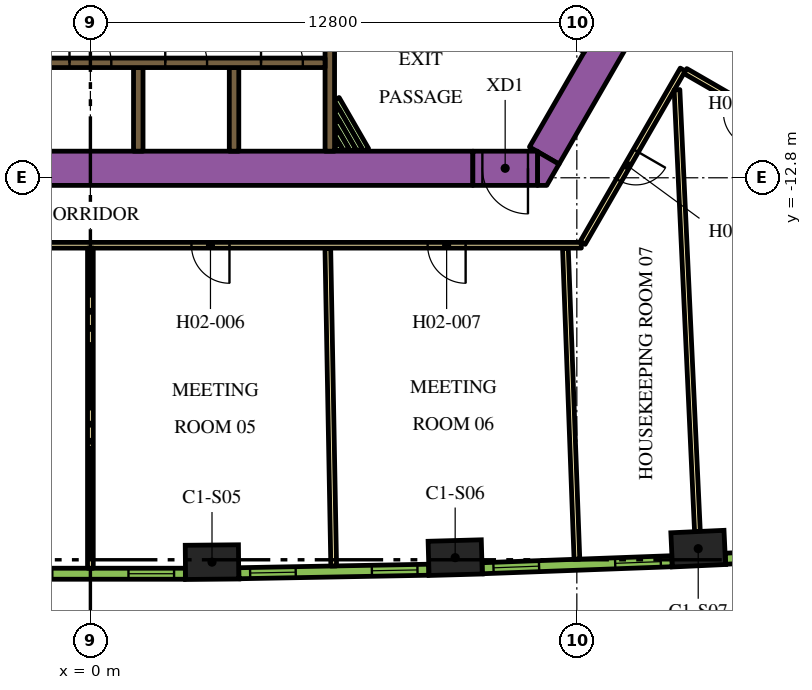
"""IFC4 building model, lengths in metres.
Left out: names, types, materials, properties, quantities, classifications, styles, units other than length and angle.
Written with IfcOpenShell. Run it as: python <this file> out.ifc"""

import sys

from ifc_helpers import new_model, si_unit, direction, frame, frame_2d, origin, origin_2d, place, context, subcontext, project, spatial, polyline, rectangle, outline, extrude, element, fill, save


model = new_model("IFC4")
c1 = context("Model", 3, precision=1e-05, world=origin(), true_north=direction((0.0, 1.0)))
c2 = subcontext(c1, "Body", "Model", "MODEL_VIEW")
j1 = project(units=[si_unit("LENGTHUNIT", "METRE"), si_unit("PLANEANGLEUNIT", "RADIAN")], contexts=[c1])
p1 = place(None, origin())
s1 = spatial("IfcSite", under=j1, at=p1, CompositionType="ELEMENT")
p2 = place(p1, origin())
s2 = spatial("IfcBuilding", under=s1, at=p2, CompositionType="ELEMENT")
p3 = place(p2, frame((0.0, 0.0, 43.2)))
s3 = spatial("IfcBuildingStorey", under=s2, at=p3, CompositionType="ELEMENT", Elevation=43.2)
for number, where, z_axis, x_axis in (
    (1, (3.2, -22.913, 0.0), (0.0, 0.0, 1.0), (1.0, 0.009, 0.0)),
    (2, (9.599, -22.795, 0.0), (0.0, 0.0, 1.0), (1.0, 0.028, 0.0)),
    (3, (15.994, -22.558, 0.0), (0.0, 0.0, 1.0), (0.999, 0.046, 0.0)),
):
    element("IfcColumn", number, at=place(p3, frame(where, z_axis=z_axis, x_axis=x_axis)), inside=s3, PredefinedType="COLUMN", context=c2, shape_type="SweptSolid", body=[
        extrude(rectangle(XDim=1.4, YDim=0.9, at=origin_2d()), origin(), (0.0, 0.0, 1.0), 3.9),
    ])
p4 = place(p3, frame((11.943, -12.214, 0.0), z_axis=(0.0, 0.0, 1.0), x_axis=(0.49998092645, 0.866036415623, 0.0)))
e4 = element("IfcWall", 4, at=p4, inside=s3, PredefinedType="SOLIDWALL", context=c2, shape_type="SweptSolid", body=[
    extrude(rectangle(XDim=8.83, YDim=0.9, at=frame_2d((4.415, 0.0))), origin(), (0.0, 0.0, 1.0), 3.9),
])
p5 = place(p3, origin())
e5 = element("IfcWall", 5, at=p5, inside=s3, PredefinedType="SOLIDWALL", context=c2, shape_type="SweptSolid", body=[
    extrude(outline(polyline([(12.009, -13.0), (11.764, -13.0), (11.764, -12.113), (12.332, -12.441), (12.009, -13.0)])), origin(), (0.0, 0.0, 1.0), 3.9),
])
p6 = place(p3, frame((-12.019, -12.55, 0.0), z_axis=(0.0, 0.0, 1.0), x_axis=(1.0, 0.0, 0.0)))
e6 = element("IfcWall", 6, at=p6, inside=s3, PredefinedType="SOLIDWALL", context=c2, shape_type="SweptSolid", body=[
    extrude(rectangle(XDim=22.083, YDim=0.9, at=frame_2d((11.042, 0.0))), origin(), (0.0, 0.0, 1.0), 3.9),
])
p7 = place(p3, frame((6.3, -12.1, 0.0), z_axis=(0.0, 0.0, 1.0), x_axis=(0.0, 1.0, 0.0)))
e7 = element("IfcWall", 7, at=p7, inside=s3, PredefinedType="SOLIDWALL", context=c2, shape_type="SweptSolid", body=[
    extrude(rectangle(XDim=3.428, YDim=0.25, at=frame_2d((1.714, 0.0))), origin(), (0.0, 0.0, 1.0), 3.9),
])
for number, where, z_axis, x_axis in (
    (8, (3.78, -12.1, 0.0), (0.0, 0.0, 1.0), (0.0, 1.0, 0.0)),
    (9, (1.26, -12.1, 0.0), (0.0, 0.0, 1.0), (0.0, 1.0, 0.0)),
):
    element("IfcWall", number, at=place(p3, frame(where, z_axis=z_axis, x_axis=x_axis)), inside=s3, PredefinedType="SOLIDWALL", context=c2, shape_type="SweptSolid", body=[
        extrude(rectangle(XDim=2.2, YDim=0.25, at=frame_2d((1.1, 0.0))), origin(), (0.0, 0.0, 1.0), 3.9),
    ])
p8 = place(p3, frame((6.48, -10.726, 0.0), z_axis=(0.0, 0.0, 1.0), x_axis=(0.500017819788, -0.86601511528, 0.0)))
e10 = element("IfcWall", 10, at=p8, inside=s3, PredefinedType="PARTITIONING", context=c2, shape_type="SweptSolid", body=[
    extrude(rectangle(XDim=1.55, YDim=0.15, at=frame_2d((0.775, 0.0))), origin(), (0.0, 0.0, 1.0), 2.75),
])
p9 = place(p3, frame((6.48, -11.026, 0.0), z_axis=(0.0, 0.0, 1.0), x_axis=(0.49995654735, -0.86605048973, 0.0)))
e11 = element("IfcWall", 11, at=p9, inside=s3, PredefinedType="PARTITIONING", context=c2, shape_type="SweptSolid", body=[
    extrude(rectangle(XDim=1.204, YDim=0.15, at=frame_2d((0.602, 0.0))), origin(), (0.0, 0.0, 1.0), 2.75),
])
p10 = place(p3, frame((6.48, -11.326, 0.0), z_axis=(0.0, 0.0, 1.0), x_axis=(0.500059337743, -0.865991142412, 0.0)))
e12 = element("IfcWall", 12, at=p10, inside=s3, PredefinedType="PARTITIONING", context=c2, shape_type="SweptSolid", body=[
    extrude(rectangle(XDim=0.857, YDim=0.15, at=frame_2d((0.429, 0.0))), origin(), (0.0, 0.0, 1.0), 2.75),
])
p11 = place(p3, frame((6.48, -11.626, 0.0), z_axis=(0.0, 0.0, 1.0), x_axis=(0.500301480982, -0.865851273677, 0.0)))
e13 = element("IfcWall", 13, at=p11, inside=s3, PredefinedType="PARTITIONING", context=c2, shape_type="SweptSolid", body=[
    extrude(rectangle(XDim=0.511, YDim=0.15, at=frame_2d((0.255, 0.0))), origin(), (0.0, 0.0, 1.0), 2.75),
])
p12 = place(p3, frame((6.48, -11.926, 0.0), z_axis=(0.0, 0.0, 1.0), x_axis=(0.500450775723, -0.86576499183, 0.0)))
e14 = element("IfcWall", 14, at=p12, inside=s3, PredefinedType="PARTITIONING", context=c2, shape_type="SweptSolid", body=[
    extrude(rectangle(XDim=0.164, YDim=0.15, at=frame_2d((0.082, 0.0))), origin(), (0.0, 0.0, 1.0), 2.75),
])
p13 = place(p3, frame((-6.175, -9.775, 0.0), z_axis=(0.0, 0.0, 1.0), x_axis=(1.0, 0.0, 0.0)))
e15 = element("IfcWall", 15, at=p13, inside=s3, PredefinedType="SOLIDWALL", context=c2, shape_type="SweptSolid", body=[
    extrude(rectangle(XDim=12.35, YDim=0.25, at=frame_2d((6.175, 0.0))), origin(), (0.0, 0.0, 1.0), 3.9),
])
p14 = place(p13, frame((0.585, 0.0, 0.0)))
e16 = element("IfcOpeningElement", 16, at=p14, cuts=e15, PredefinedType="OPENING", context=c2, shape_type="SweptSolid", body=[
    extrude(rectangle(XDim=1.1, YDim=2.1, at=frame_2d((0.55, 1.05))), frame((0.0, 0.135, 0.0), z_axis=(0.0, -1.0, 0.0), x_axis=(1.0, 0.0, 0.0)), (0.0, 0.0, 1.0), 0.27),
])
p15 = place(p13, frame((3.105, 0.0, 0.0)))
e17 = element("IfcOpeningElement", 17, at=p15, cuts=e15, PredefinedType="OPENING", context=c2, shape_type="SweptSolid", body=[
    extrude(rectangle(XDim=1.1, YDim=2.1, at=frame_2d((0.55, 1.05))), frame((0.0, 0.135, 0.0), z_axis=(0.0, -1.0, 0.0), x_axis=(1.0, 0.0, 0.0)), (0.0, 0.0, 1.0), 0.27),
])
p16 = place(p13, frame((5.625, 0.0, 0.0)))
e18 = element("IfcOpeningElement", 18, at=p16, cuts=e15, PredefinedType="OPENING", context=c2, shape_type="SweptSolid", body=[
    extrude(rectangle(XDim=1.1, YDim=2.1, at=frame_2d((0.55, 1.05))), frame((0.0, 0.135, 0.0), z_axis=(0.0, -1.0, 0.0), x_axis=(1.0, 0.0, 0.0)), (0.0, 0.0, 1.0), 0.27),
])
p17 = place(p13, frame((8.145, 0.0, 0.0)))
e19 = element("IfcOpeningElement", 19, at=p17, cuts=e15, PredefinedType="OPENING", context=c2, shape_type="SweptSolid", body=[
    extrude(rectangle(XDim=1.1, YDim=2.1, at=frame_2d((0.55, 1.05))), frame((0.0, 0.135, 0.0), z_axis=(0.0, -1.0, 0.0), x_axis=(1.0, 0.0, 0.0)), (0.0, 0.0, 1.0), 0.27),
])
p18 = place(p13, frame((10.665, 0.0, 0.0)))
e20 = element("IfcOpeningElement", 20, at=p18, cuts=e15, PredefinedType="OPENING", context=c2, shape_type="SweptSolid", body=[
    extrude(rectangle(XDim=1.1, YDim=2.1, at=frame_2d((0.55, 1.05))), frame((0.0, 0.135, 0.0), z_axis=(0.0, -1.0, 0.0), x_axis=(1.0, 0.0, 0.0)), (0.0, 0.0, 1.0), 0.27),
])
p19 = place(p3, frame((11.764, -12.55, 0.0), z_axis=(0.0, 0.0, 1.0), x_axis=(-1.0, 0.0, 0.0)))
e21 = element("IfcWall", 21, at=p19, inside=s3, PredefinedType="SOLIDWALL", context=c2, shape_type="SweptSolid", body=[
    extrude(rectangle(XDim=1.7, YDim=0.9, at=frame_2d((0.85, 0.0))), origin(), (0.0, 0.0, 1.0), 3.9),
])
p20 = place(p19, frame((0.25, 0.0, 0.0)))
e22 = element("IfcOpeningElement", 22, at=p20, cuts=e21, PredefinedType="OPENING", context=c2, shape_type="SweptSolid", body=[
    extrude(rectangle(XDim=1.2, YDim=2.1, at=frame_2d((0.6, 1.05))), frame((0.0, 0.46, 0.0), z_axis=(0.0, -1.0, 0.0), x_axis=(1.0, 0.0, 0.0)), (0.0, 0.0, 1.0), 0.92),
])
p21 = place(p3, frame((16.412, -8.523, 0.0), z_axis=(0.0, 0.0, 1.0), x_axis=(0.866022197818, -0.500005552856, 0.0)))
e23 = element("IfcWall", 23, at=p21, inside=s3, PredefinedType="PARTITIONING", context=c2, shape_type="SweptSolid", body=[
    extrude(rectangle(XDim=16.224, YDim=0.15, at=frame_2d((8.112, 0.0))), origin(), (0.0, 0.0, 1.0), 2.75),
])
p22 = place(p21, frame((7.949, 0.0, 0.0)))
e24 = element("IfcOpeningElement", 24, at=p22, cuts=e23, PredefinedType="OPENING", context=c2, shape_type="SweptSolid", body=[
    extrude(rectangle(XDim=1.0, YDim=2.1, at=frame_2d((0.5, 1.05))), frame((0.0, 0.085, 0.0), z_axis=(0.0, -1.0, 0.0), x_axis=(1.0, 0.0, 0.0)), (0.0, 0.0, 1.0), 0.17),
])
p23 = place(p21, frame((0.526, 0.0, 0.0)))
e25 = element("IfcOpeningElement", 25, at=p23, cuts=e23, PredefinedType="OPENING", context=c2, shape_type="SweptSolid", body=[
    extrude(rectangle(XDim=1.0, YDim=2.1, at=frame_2d((0.5, 1.05))), frame((0.0, 0.085, 0.0), z_axis=(0.0, -1.0, 0.0), x_axis=(1.0, 0.0, 0.0)), (0.0, 0.0, 1.0), 0.17),
])
p24 = place(p3, frame((12.918, -14.575, 0.0), z_axis=(0.0, 0.0, 1.0), x_axis=(-1.0, 0.0, 0.0)))
e26 = element("IfcWall", 26, at=p24, inside=s3, PredefinedType="PARTITIONING", context=c2, shape_type="SweptSolid", body=[
    extrude(rectangle(XDim=25.766, YDim=0.15, at=frame_2d((12.883, 0.0))), origin(), (0.0, 0.0, 1.0), 2.75),
])
p25 = place(p24, frame((17.141, 0.0, 0.0)))
e27 = element("IfcOpeningElement", 27, at=p25, cuts=e26, PredefinedType="OPENING", context=c2, shape_type="SweptSolid", body=[
    extrude(rectangle(XDim=1.0, YDim=2.1, at=frame_2d((0.5, 1.05))), frame((0.0, 0.085, 0.0), z_axis=(0.0, -1.0, 0.0), x_axis=(1.0, 0.0, 0.0)), (0.0, 0.0, 1.0), 0.17),
])
p26 = place(p24, frame((9.259, 0.0, 0.0)))
e28 = element("IfcOpeningElement", 28, at=p26, cuts=e26, PredefinedType="OPENING", context=c2, shape_type="SweptSolid", body=[
    extrude(rectangle(XDim=1.0, YDim=2.1, at=frame_2d((0.5, 1.05))), frame((0.0, 0.085, 0.0), z_axis=(0.0, -1.0, 0.0), x_axis=(1.0, 0.0, 0.0)), (0.0, 0.0, 1.0), 0.17),
])
p27 = place(p24, frame((3.044, 0.0, 0.0)))
e29 = element("IfcOpeningElement", 29, at=p27, cuts=e26, PredefinedType="OPENING", context=c2, shape_type="SweptSolid", body=[
    extrude(rectangle(XDim=1.0, YDim=2.1, at=frame_2d((0.5, 1.05))), frame((0.0, 0.085, 0.0), z_axis=(0.0, -1.0, 0.0), x_axis=(1.0, 0.0, 0.0)), (0.0, 0.0, 1.0), 0.17),
])
p28 = place(p3, frame((15.587, -9.952, 0.0), z_axis=(0.0, 0.0, 1.0), x_axis=(-0.500016618951, -0.866015808616, 0.0)))
e30 = element("IfcWall", 30, at=p28, inside=s3, PredefinedType="PARTITIONING", context=c2, shape_type="SweptSolid", body=[
    extrude(rectangle(XDim=5.268, YDim=0.15, at=frame_2d((2.634, 0.0))), origin(), (0.0, 0.0, 1.0), 2.75),
])
p29 = place(p28, frame((2.465, 0.0, 0.0)))
e31 = element("IfcOpeningElement", 31, at=p29, cuts=e30, PredefinedType="OPENING", context=c2, shape_type="SweptSolid", body=[
    extrude(rectangle(XDim=0.9, YDim=2.1, at=frame_2d((0.45, 1.05))), frame((0.0, 0.085, 0.0), z_axis=(0.0, -1.0, 0.0), x_axis=(1.0, 0.0, 0.0)), (0.0, 0.0, 1.0), 0.17),
])
p30 = place(p3, frame((29.638, -18.064, 0.0), z_axis=(0.0, 0.0, 1.0), x_axis=(-0.866026175601, 0.499998663172, 0.0)))
e32 = element("IfcWall", 32, at=p30, inside=s3, PredefinedType="PARTITIONING", context=c2, shape_type="SweptSolid", body=[
    extrude(rectangle(XDim=16.144, YDim=0.15, at=frame_2d((8.072, 0.0))), origin(), (0.0, 0.0, 1.0), 2.75),
])
p31 = place(p30, frame((13.948, 0.0, 0.0)))
e33 = element("IfcOpeningElement", 33, at=p31, cuts=e32, PredefinedType="OPENING", context=c2, shape_type="SweptSolid", body=[
    extrude(rectangle(XDim=0.9, YDim=2.1, at=frame_2d((0.45, 1.05))), frame((0.0, 0.085, 0.0), z_axis=(0.0, -1.0, 0.0), x_axis=(1.0, 0.0, 0.0)), (0.0, 0.0, 1.0), 0.17),
])
p32 = place(p30, frame((11.004, 0.0, 0.0)))
e34 = element("IfcOpeningElement", 34, at=p32, cuts=e32, PredefinedType="OPENING", context=c2, shape_type="SweptSolid", body=[
    extrude(rectangle(XDim=1.0, YDim=2.1, at=frame_2d((0.5, 1.05))), frame((0.0, 0.085, 0.0), z_axis=(0.0, -1.0, 0.0), x_axis=(1.0, 0.0, 0.0)), (0.0, 0.0, 1.0), 0.17),
])
p33 = place(p3, frame((0.0, -23.073, 0.0), z_axis=(0.0, 0.0, 1.0), x_axis=(0.0, 1.0, 0.0)))
e35 = element("IfcWall", 35, at=p33, inside=s3, PredefinedType="PARTITIONING", context=c2, shape_type="SweptSolid", body=[
    extrude(rectangle(XDim=8.423, YDim=0.15, at=frame_2d((4.212, 0.0))), origin(), (0.0, 0.0, 1.0), 2.75),
])
p34 = place(p3, frame((6.402, -23.014, 0.0), z_axis=(0.0, 0.0, 1.0), x_axis=(-0.01849587109, 0.999828936745, 0.0)))
e36 = element("IfcWall", 36, at=p34, inside=s3, PredefinedType="PARTITIONING", context=c2, shape_type="SweptSolid", body=[
    extrude(rectangle(XDim=8.355, YDim=0.15, at=frame_2d((4.178, 0.0))), origin(), (0.0, 0.0, 1.0), 2.75),
])
p35 = place(p3, frame((12.802, -22.836, 0.0), z_axis=(0.0, 0.0, 1.0), x_axis=(-0.036969723281, 0.999316386116, 0.0)))
e37 = element("IfcWall", 37, at=p35, inside=s3, PredefinedType="PARTITIONING", context=c2, shape_type="SweptSolid", body=[
    extrude(rectangle(XDim=8.182, YDim=0.15, at=frame_2d((4.091, 0.0))), origin(), (0.0, 0.0, 1.0), 2.75),
])
p36 = place(p3, frame((15.973, -22.109, 0.0), z_axis=(0.0, 0.0, 1.0), x_axis=(-0.046191717129, 0.998932592955, 0.0)))
e38 = element("IfcWall", 38, at=p36, inside=s3, PredefinedType="PARTITIONING", context=c2, shape_type="SweptSolid", body=[
    extrude(rectangle(XDim=11.638, YDim=0.15, at=frame_2d((5.819, 0.0))), origin(), (0.0, 0.0, 1.0), 2.75),
])
p37 = place(p3, frame((-2.499, -23.218, 0.0), z_axis=(0.0, 0.0, 1.0), x_axis=(1.0, 0.0, 0.0)))
e39 = element("IfcWall", 39, at=p37, inside=s3, PredefinedType="SOLIDWALL", context=c2, shape_type="SweptSolid", body=[
    extrude(rectangle(XDim=4.998, YDim=0.29, at=frame_2d((2.499, 0.0))), origin(), (0.0, 0.0, 1.0), 3.65),
])
p38 = place(p37, frame((0.297, 0.0, 0.9)))
e40 = element("IfcOpeningElement", 40, at=p38, cuts=e39, PredefinedType="OPENING", context=c2, shape_type="SweptSolid", body=[
    extrude(rectangle(XDim=1.2, YDim=2.15, at=frame_2d((0.6, 1.075))), frame((0.0, 0.155, 0.0), z_axis=(0.0, -1.0, 0.0), x_axis=(1.0, 0.0, 0.0)), (0.0, 0.0, 1.0), 0.31),
])
p39 = place(p37, frame((3.501, 0.0, 0.9)))
e41 = element("IfcOpeningElement", 41, at=p39, cuts=e39, PredefinedType="OPENING", context=c2, shape_type="SweptSolid", body=[
    extrude(rectangle(XDim=1.2, YDim=2.15, at=frame_2d((0.6, 1.075))), frame((0.0, 0.155, 0.0), z_axis=(0.0, -1.0, 0.0), x_axis=(1.0, 0.0, 0.0)), (0.0, 0.0, 1.0), 0.31),
])
p40 = place(p3, frame((3.906, -23.205, 0.0), z_axis=(0.0, 0.0, 1.0), x_axis=(0.999829529479, 0.018463801951, 0.0)))
e42 = element("IfcWall", 42, at=p40, inside=s3, PredefinedType="SOLIDWALL", context=c2, shape_type="SweptSolid", body=[
    extrude(rectangle(XDim=4.998, YDim=0.29, at=frame_2d((2.499, 0.0))), origin(), (0.0, 0.0, 1.0), 3.65),
])
p41 = place(p40, frame((0.297, 0.0, 0.9)))
e43 = element("IfcOpeningElement", 43, at=p41, cuts=e42, PredefinedType="OPENING", context=c2, shape_type="SweptSolid", body=[
    extrude(rectangle(XDim=1.2, YDim=2.15, at=frame_2d((0.6, 1.075))), frame((0.0, 0.155, 0.0), z_axis=(0.0, -1.0, 0.0), x_axis=(1.0, 0.0, 0.0)), (0.0, 0.0, 1.0), 0.31),
])
p42 = place(p40, frame((3.501, 0.0, 0.9)))
e44 = element("IfcOpeningElement", 44, at=p42, cuts=e42, PredefinedType="OPENING", context=c2, shape_type="SweptSolid", body=[
    extrude(rectangle(XDim=1.2, YDim=2.15, at=frame_2d((0.6, 1.075))), frame((0.0, 0.155, 0.0), z_axis=(0.0, -1.0, 0.0), x_axis=(1.0, 0.0, 0.0)), (0.0, 0.0, 1.0), 0.31),
])
p43 = place(p3, frame((10.31, -23.074, 0.0), z_axis=(0.0, 0.0, 1.0), x_axis=(0.999317974969, 0.036926750529, 0.0)))
e45 = element("IfcWall", 45, at=p43, inside=s3, PredefinedType="SOLIDWALL", context=c2, shape_type="SweptSolid", body=[
    extrude(rectangle(XDim=4.998, YDim=0.29, at=frame_2d((2.499, 0.0))), origin(), (0.0, 0.0, 1.0), 3.65),
])
p44 = place(p43, frame((0.297, 0.0, 0.9)))
e46 = element("IfcOpeningElement", 46, at=p44, cuts=e45, PredefinedType="OPENING", context=c2, shape_type="SweptSolid", body=[
    extrude(rectangle(XDim=1.2, YDim=2.15, at=frame_2d((0.6, 1.075))), frame((0.0, 0.155, 0.0), z_axis=(0.0, -1.0, 0.0), x_axis=(1.0, 0.0, 0.0)), (0.0, 0.0, 1.0), 0.31),
])
p45 = place(p43, frame((3.501, 0.0, 0.9)))
e47 = element("IfcOpeningElement", 47, at=p45, cuts=e45, PredefinedType="OPENING", context=c2, shape_type="SweptSolid", body=[
    extrude(rectangle(XDim=1.2, YDim=2.15, at=frame_2d((0.6, 1.075))), frame((0.0, 0.155, 0.0), z_axis=(0.0, -1.0, 0.0), x_axis=(1.0, 0.0, 0.0)), (0.0, 0.0, 1.0), 0.31),
])
p46 = place(p3, frame((16.711, -22.824, 0.0), z_axis=(0.0, 0.0, 1.0), x_axis=(0.998464708705, 0.055391564976, 0.0)))
e48 = element("IfcWall", 48, at=p46, inside=s3, PredefinedType="SOLIDWALL", context=c2, shape_type="SweptSolid", body=[
    extrude(rectangle(XDim=4.998, YDim=0.29, at=frame_2d((2.499, 0.0))), origin(), (0.0, 0.0, 1.0), 3.65),
])
p47 = place(p46, frame((0.297, 0.0, 0.9)))
e49 = element("IfcOpeningElement", 49, at=p47, cuts=e48, PredefinedType="OPENING", context=c2, shape_type="SweptSolid", body=[
    extrude(rectangle(XDim=1.2, YDim=2.15, at=frame_2d((0.6, 1.075))), frame((0.0, 0.155, 0.0), z_axis=(0.0, -1.0, 0.0), x_axis=(1.0, 0.0, 0.0)), (0.0, 0.0, 1.0), 0.31),
])
p48 = place(p46, frame((3.501, 0.0, 0.9)))
e50 = element("IfcOpeningElement", 50, at=p48, cuts=e48, PredefinedType="OPENING", context=c2, shape_type="SweptSolid", body=[
    extrude(rectangle(XDim=1.2, YDim=2.15, at=frame_2d((0.6, 1.075))), frame((0.0, 0.155, 0.0), z_axis=(0.0, -1.0, 0.0), x_axis=(1.0, 0.0, 0.0)), (0.0, 0.0, 1.0), 0.31),
])
p49 = place(p16, origin())
e51 = element("IfcDoor", 51, at=p49, inside=s3, OperationType="DOUBLE_DOOR_SLIDING", PredefinedType="DOOR", context=c2, shape_type="SweptSolid", body=[
    extrude(rectangle(XDim=1.1, YDim=2.1, at=frame_2d((0.55, 1.05))), frame((0.0, 0.025, 0.0), z_axis=(0.0, -1.0, 0.0), x_axis=(1.0, 0.0, 0.0)), (0.0, 0.0, 1.0), 0.05),
])
fill(e18, e51)
p50 = place(p17, origin())
e52 = element("IfcDoor", 52, at=p50, inside=s3, OperationType="DOUBLE_DOOR_SLIDING", PredefinedType="DOOR", context=c2, shape_type="SweptSolid", body=[
    extrude(rectangle(XDim=1.1, YDim=2.1, at=frame_2d((0.55, 1.05))), frame((0.0, 0.025, 0.0), z_axis=(0.0, -1.0, 0.0), x_axis=(1.0, 0.0, 0.0)), (0.0, 0.0, 1.0), 0.05),
])
fill(e19, e52)
p51 = place(p18, origin())
e53 = element("IfcDoor", 53, at=p51, inside=s3, OperationType="DOUBLE_DOOR_SLIDING", PredefinedType="DOOR", context=c2, shape_type="SweptSolid", body=[
    extrude(rectangle(XDim=1.1, YDim=2.1, at=frame_2d((0.55, 1.05))), frame((0.0, 0.025, 0.0), z_axis=(0.0, -1.0, 0.0), x_axis=(1.0, 0.0, 0.0)), (0.0, 0.0, 1.0), 0.05),
])
fill(e20, e53)
p52 = place(p20, origin())
e54 = element("IfcDoor", 54, at=p52, inside=s3, OperationType="SINGLE_SWING_LEFT", PredefinedType="DOOR", context=c2, shape_type="SweptSolid", body=[
    extrude(rectangle(XDim=1.2, YDim=2.1, at=frame_2d((0.6, 1.05))), frame((0.0, 0.025, 0.0), z_axis=(0.0, -1.0, 0.0), x_axis=(1.0, 0.0, 0.0)), (0.0, 0.0, 1.0), 0.05),
])
fill(e22, e54)
p53 = place(p26, origin())
e55 = element("IfcDoor", 55, at=p53, inside=s3, OperationType="SINGLE_SWING_LEFT", PredefinedType="DOOR", context=c2, shape_type="SweptSolid", body=[
    extrude(rectangle(XDim=1.0, YDim=2.1, at=frame_2d((0.5, 1.05))), frame((0.0, 0.025, 0.0), z_axis=(0.0, -1.0, 0.0), x_axis=(1.0, 0.0, 0.0)), (0.0, 0.0, 1.0), 0.05),
])
fill(e28, e55)
p54 = place(p27, origin())
e56 = element("IfcDoor", 56, at=p54, inside=s3, OperationType="SINGLE_SWING_RIGHT", PredefinedType="DOOR", context=c2, shape_type="SweptSolid", body=[
    extrude(rectangle(XDim=1.0, YDim=2.1, at=frame_2d((0.5, 1.05))), frame((0.0, 0.025, 0.0), z_axis=(0.0, -1.0, 0.0), x_axis=(1.0, 0.0, 0.0)), (0.0, 0.0, 1.0), 0.05),
])
fill(e29, e56)
p55 = place(p29, origin())
e57 = element("IfcDoor", 57, at=p55, inside=s3, OperationType="SINGLE_SWING_LEFT", PredefinedType="DOOR", context=c2, shape_type="SweptSolid", body=[
    extrude(rectangle(XDim=0.9, YDim=2.1, at=frame_2d((0.45, 1.05))), frame((0.0, 0.025, 0.0), z_axis=(0.0, -1.0, 0.0), x_axis=(1.0, 0.0, 0.0)), (0.0, 0.0, 1.0), 0.05),
])
fill(e31, e57)
p56 = place(p31, origin())
e58 = element("IfcDoor", 58, at=p56, inside=s3, OperationType="SINGLE_SWING_RIGHT", PredefinedType="DOOR", context=c2, shape_type="SweptSolid", body=[
    extrude(rectangle(XDim=0.9, YDim=2.1, at=frame_2d((0.45, 1.05))), frame((0.0, 0.025, 0.0), z_axis=(0.0, -1.0, 0.0), x_axis=(1.0, 0.0, 0.0)), (0.0, 0.0, 1.0), 0.05),
])
fill(e33, e58)
p57 = place(p39, origin())
e59 = element("IfcWindow", 59, at=p57, inside=s3, PartitioningType="DOUBLE_PANEL_VERTICAL", PredefinedType="WINDOW", context=c2, shape_type="SweptSolid", body=[
    extrude(rectangle(XDim=1.2, YDim=2.15, at=frame_2d((0.6, 1.075))), frame((0.0, 0.015, 0.0), z_axis=(0.0, -1.0, 0.0), x_axis=(1.0, 0.0, 0.0)), (0.0, 0.0, 1.0), 0.06),
])
fill(e41, e59)
p58 = place(p41, origin())
e60 = element("IfcWindow", 60, at=p58, inside=s3, PartitioningType="DOUBLE_PANEL_VERTICAL", PredefinedType="WINDOW", context=c2, shape_type="SweptSolid", body=[
    extrude(rectangle(XDim=1.2, YDim=2.15, at=frame_2d((0.6, 1.075))), frame((0.0, 0.015, 0.0), z_axis=(0.0, -1.0, 0.0), x_axis=(1.0, 0.0, 0.0)), (0.0, 0.0, 1.0), 0.06),
])
fill(e43, e60)
p59 = place(p42, origin())
e61 = element("IfcWindow", 61, at=p59, inside=s3, PartitioningType="DOUBLE_PANEL_VERTICAL", PredefinedType="WINDOW", context=c2, shape_type="SweptSolid", body=[
    extrude(rectangle(XDim=1.2, YDim=2.15, at=frame_2d((0.6, 1.075))), frame((0.0, 0.015, 0.0), z_axis=(0.0, -1.0, 0.0), x_axis=(1.0, 0.0, 0.0)), (0.0, 0.0, 1.0), 0.06),
])
fill(e44, e61)
p60 = place(p44, origin())
e62 = element("IfcWindow", 62, at=p60, inside=s3, PartitioningType="DOUBLE_PANEL_VERTICAL", PredefinedType="WINDOW", context=c2, shape_type="SweptSolid", body=[
    extrude(rectangle(XDim=1.2, YDim=2.15, at=frame_2d((0.6, 1.075))), frame((0.0, 0.015, 0.0), z_axis=(0.0, -1.0, 0.0), x_axis=(1.0, 0.0, 0.0)), (0.0, 0.0, 1.0), 0.06),
])
fill(e46, e62)
p61 = place(p45, origin())
e63 = element("IfcWindow", 63, at=p61, inside=s3, PartitioningType="DOUBLE_PANEL_VERTICAL", PredefinedType="WINDOW", context=c2, shape_type="SweptSolid", body=[
    extrude(rectangle(XDim=1.2, YDim=2.15, at=frame_2d((0.6, 1.075))), frame((0.0, 0.015, 0.0), z_axis=(0.0, -1.0, 0.0), x_axis=(1.0, 0.0, 0.0)), (0.0, 0.0, 1.0), 0.06),
])
fill(e47, e63)
save(model, sys.argv[1])
